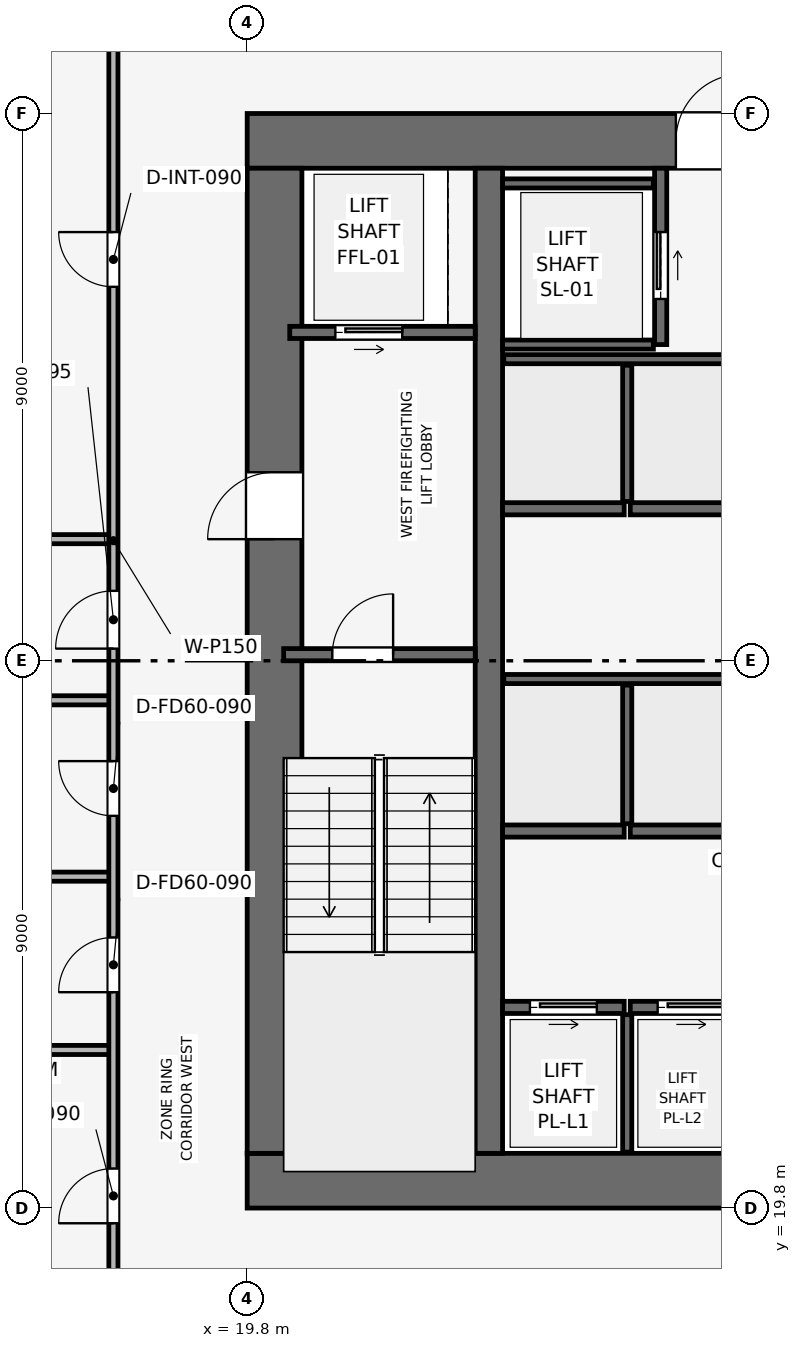
"""IFC4 building model, lengths in metres.
Left out: names, types, materials, properties, quantities, classifications, styles, units other than length and angle.
Written with IfcOpenShell. Run it as: python <this file> out.ifc"""

import sys

from ifc_helpers import new_model, si_unit, direction, frame, frame_2d, origin, place, context, subcontext, project, spatial, rectangle, extrude, element, fill, save


model = new_model("IFC4")
c1 = context("Model", 3, precision=1e-05, world=origin(), true_north=direction((0.0, 1.0)))
c2 = subcontext(c1, "Body", "Model", "MODEL_VIEW")
j1 = project(units=[si_unit("LENGTHUNIT", "METRE"), si_unit("PLANEANGLEUNIT", "RADIAN")], contexts=[c1])
p1 = place(None, origin())
s1 = spatial("IfcSite", under=j1, at=p1, CompositionType="ELEMENT")
p2 = place(p1, origin())
s2 = spatial("IfcBuilding", under=s1, at=p2, CompositionType="ELEMENT")
p3 = place(p2, frame((0.0, 0.0, 121.2)))
s3 = spatial("IfcBuildingStorey", under=s2, at=p3, CompositionType="ELEMENT", Elevation=121.2)
p4 = place(p3, frame((19.8, 20.25, 0.0), z_axis=(0.0, 0.0, 1.0), x_axis=(1.0, 0.0, 0.0)))
e1 = element("IfcWall", 1, at=p4, inside=s3, PredefinedType="SHEAR", context=c2, shape_type="SweptSolid", body=[
    extrude(rectangle(XDim=18.0, YDim=0.9, at=frame_2d((9.0, 0.0))), origin(), (0.0, 0.0, 1.0), 3.9),
])
p5 = place(p4, frame((8.4, 0.0, 0.0)))
e2 = element("IfcOpeningElement", 2, at=p5, cuts=e1, PredefinedType="OPENING", context=c2, shape_type="SweptSolid", body=[
    extrude(rectangle(XDim=1.2, YDim=2.2, at=frame_2d((0.6, 1.1))), frame((0.0, 0.46, 0.0), z_axis=(0.0, -1.0, 0.0), x_axis=(1.0, 0.0, 0.0)), (0.0, 0.0, 1.0), 0.92),
])
p6 = place(p3, frame((19.8, 37.35, 0.0), z_axis=(0.0, 0.0, 1.0), x_axis=(1.0, 0.0, 0.0)))
e3 = element("IfcWall", 3, at=p6, inside=s3, PredefinedType="SHEAR", context=c2, shape_type="SweptSolid", body=[
    extrude(rectangle(XDim=18.0, YDim=0.9, at=frame_2d((9.0, 0.0))), origin(), (0.0, 0.0, 1.0), 3.9),
])
p7 = place(p6, frame((7.05, 0.0, 0.0)))
e4 = element("IfcOpeningElement", 4, at=p7, cuts=e3, PredefinedType="OPENING", context=c2, shape_type="SweptSolid", body=[
    extrude(rectangle(XDim=1.1, YDim=2.15, at=frame_2d((0.55, 1.075))), frame((0.0, 0.46, 0.0), z_axis=(0.0, -1.0, 0.0), x_axis=(1.0, 0.0, 0.0)), (0.0, 0.0, 1.0), 0.92),
])
p8 = place(p3, frame((20.25, 20.7, 0.0), z_axis=(0.0, 0.0, 1.0), x_axis=(0.0, 1.0, 0.0)))
e5 = element("IfcWall", 5, at=p8, inside=s3, PredefinedType="SHEAR", context=c2, shape_type="SweptSolid", body=[
    extrude(rectangle(XDim=16.2, YDim=0.9, at=frame_2d((8.1, 0.0))), origin(), (0.0, 0.0, 1.0), 3.9),
])
p9 = place(p8, frame((10.1, 0.0, 0.0)))
e6 = element("IfcOpeningElement", 6, at=p9, cuts=e5, PredefinedType="OPENING", context=c2, shape_type="SweptSolid", body=[
    extrude(rectangle(XDim=1.1, YDim=2.15, at=frame_2d((0.55, 1.075))), frame((0.0, 0.46, 0.0), z_axis=(0.0, -1.0, 0.0), x_axis=(1.0, 0.0, 0.0)), (0.0, 0.0, 1.0), 0.92),
])
p10 = place(p3, frame((23.775, 20.7, 0.0), z_axis=(0.0, 0.0, 1.0), x_axis=(0.0, 1.0, 0.0)))
e7 = element("IfcWall", 7, at=p10, inside=s3, PredefinedType="SHEAR", context=c2, shape_type="SweptSolid", body=[
    extrude(rectangle(XDim=16.2, YDim=0.45, at=frame_2d((8.1, 0.0))), origin(), (0.0, 0.0, 1.0), 3.9),
])
p11 = place(p3, frame((20.4, 28.9, 0.0), z_axis=(0.0, 0.0, 1.0), x_axis=(1.0, 0.0, 0.0)))
e8 = element("IfcWall", 8, at=p11, inside=s3, PredefinedType="SHEAR", context=c2, shape_type="SweptSolid", body=[
    extrude(rectangle(XDim=3.15, YDim=0.2, at=frame_2d((1.575, 0.0))), origin(), (0.0, 0.0, 1.0), 3.65),
])
p12 = place(p11, frame((0.8, 0.0, 0.0)))
e9 = element("IfcOpeningElement", 9, at=p12, cuts=e8, PredefinedType="OPENING", context=c2, shape_type="SweptSolid", body=[
    extrude(rectangle(XDim=1.0, YDim=2.1, at=frame_2d((0.5, 1.05))), frame((0.0, 0.11, 0.0), z_axis=(0.0, -1.0, 0.0), x_axis=(1.0, 0.0, 0.0)), (0.0, 0.0, 1.0), 0.22),
])
p13 = place(p3, frame((20.5, 34.2, 0.0), z_axis=(0.0, 0.0, 1.0), x_axis=(1.0, 0.0, 0.0)))
e10 = element("IfcWall", 10, at=p13, inside=s3, PredefinedType="SHEAR", context=c2, shape_type="SweptSolid", body=[
    extrude(rectangle(XDim=3.05, YDim=0.2, at=frame_2d((1.525, 0.0))), origin(), (0.0, 0.0, 1.0), 3.65),
])
p14 = place(p13, frame((0.75, 0.0, 0.0)))
e11 = element("IfcOpeningElement", 11, at=p14, cuts=e10, PredefinedType="OPENING", context=c2, shape_type="SweptSolid", body=[
    extrude(rectangle(XDim=1.1, YDim=2.15, at=frame_2d((0.55, 1.075))), frame((0.0, 0.11, 0.0), z_axis=(0.0, -1.0, 0.0), x_axis=(1.0, 0.0, 0.0)), (0.0, 0.0, 1.0), 0.22),
])
p15 = place(p3, frame((26.6, 34.0, 0.0), z_axis=(0.0, 0.0, 1.0), x_axis=(0.0, 1.0, 0.0)))
e12 = element("IfcWall", 12, at=p15, inside=s3, PredefinedType="SHEAR", context=c2, shape_type="SweptSolid", body=[
    extrude(rectangle(XDim=2.9, YDim=0.2, at=frame_2d((1.45, 0.0))), origin(), (0.0, 0.0, 1.0), 3.65),
])
p16 = place(p15, frame((0.75, 0.0, 0.0)))
e13 = element("IfcOpeningElement", 13, at=p16, cuts=e12, PredefinedType="OPENING", context=c2, shape_type="SweptSolid", body=[
    extrude(rectangle(XDim=1.1, YDim=2.15, at=frame_2d((0.55, 1.075))), frame((0.0, 0.11, 0.0), z_axis=(0.0, -1.0, 0.0), x_axis=(1.0, 0.0, 0.0)), (0.0, 0.0, 1.0), 0.22),
])
for number, where, z_axis, x_axis in (
    (14, (24.0, 34.0, 0.0), (0.0, 0.0, 1.0), (1.0, 0.0, 0.0)),
    (15, (24.0, 36.65, 0.0), (0.0, 0.0, 1.0), (1.0, 0.0, 0.0)),
):
    element("IfcWall", number, at=place(p3, frame(where, z_axis=z_axis, x_axis=x_axis)), inside=s3, PredefinedType="SHEAR", context=c2, shape_type="SweptSolid", body=[
        extrude(rectangle(XDim=2.48, YDim=0.15, at=frame_2d((1.24, 0.0))), origin(), (0.0, 0.0, 1.0), 3.65),
    ])
p17 = place(p3, frame((24.0, 23.1, 0.0), z_axis=(0.0, 0.0, 1.0), x_axis=(1.0, 0.0, 0.0)))
e16 = element("IfcWall", 16, at=p17, inside=s3, PredefinedType="SHEAR", context=c2, shape_type="SweptSolid", body=[
    extrude(rectangle(XDim=2.0, YDim=0.2, at=frame_2d((1.0, 0.0))), origin(), (0.0, 0.0, 1.0), 3.65),
])
p18 = place(p17, frame((0.45, 0.0, 0.0)))
e17 = element("IfcOpeningElement", 17, at=p18, cuts=e16, PredefinedType="OPENING", context=c2, shape_type="SweptSolid", body=[
    extrude(rectangle(XDim=1.1, YDim=2.15, at=frame_2d((0.55, 1.075))), frame((0.0, 0.11, 0.0), z_axis=(0.0, -1.0, 0.0), x_axis=(1.0, 0.0, 0.0)), (0.0, 0.0, 1.0), 0.22),
])
p19 = place(p3, frame((26.1, 23.1, 0.0), z_axis=(0.0, 0.0, 1.0), x_axis=(1.0, 0.0, 0.0)))
e18 = element("IfcWall", 18, at=p19, inside=s3, PredefinedType="SHEAR", context=c2, shape_type="SweptSolid", body=[
    extrude(rectangle(XDim=2.0, YDim=0.2, at=frame_2d((1.0, 0.0))), origin(), (0.0, 0.0, 1.0), 3.65),
])
p20 = place(p19, frame((0.45, 0.0, 0.0)))
e19 = element("IfcOpeningElement", 19, at=p20, cuts=e18, PredefinedType="OPENING", context=c2, shape_type="SweptSolid", body=[
    extrude(rectangle(XDim=1.1, YDim=2.15, at=frame_2d((0.55, 1.075))), frame((0.0, 0.11, 0.0), z_axis=(0.0, -1.0, 0.0), x_axis=(1.0, 0.0, 0.0)), (0.0, 0.0, 1.0), 0.22),
])
for number, where, z_axis, x_axis in (
    (20, (24.0, 26.0, 0.0), (0.0, 0.0, 1.0), (1.0, 0.0, 0.0)),
    (21, (26.1, 26.0, 0.0), (0.0, 0.0, 1.0), (1.0, 0.0, 0.0)),
    (22, (24.0, 31.3, 0.0), (0.0, 0.0, 1.0), (1.0, 0.0, 0.0)),
    (23, (26.1, 31.3, 0.0), (0.0, 0.0, 1.0), (1.0, 0.0, 0.0)),
):
    element("IfcWall", number, at=place(p3, frame(where, z_axis=z_axis, x_axis=x_axis)), inside=s3, PredefinedType="SHEAR", context=c2, shape_type="SweptSolid", body=[
        extrude(rectangle(XDim=2.0, YDim=0.2, at=frame_2d((1.0, 0.0))), origin(), (0.0, 0.0, 1.0), 3.65),
    ])
p21 = place(p3, frame((26.05, 20.72, 0.0), z_axis=(0.0, 0.0, 1.0), x_axis=(0.0, 1.0, 0.0)))
e24 = element("IfcWall", 24, at=p21, inside=s3, PredefinedType="SHEAR", context=c2, shape_type="SweptSolid", body=[
    extrude(rectangle(XDim=2.26, YDim=0.15, at=frame_2d((1.13, 0.0))), origin(), (0.0, 0.0, 1.0), 3.65),
])
p22 = place(p3, frame((24.02, 28.5, 0.0), z_axis=(0.0, 0.0, 1.0), x_axis=(1.0, 0.0, 0.0)))
e25 = element("IfcWall", 25, at=p22, inside=s3, PredefinedType="SHEAR", context=c2, shape_type="SweptSolid", body=[
    extrude(rectangle(XDim=4.08, YDim=0.15, at=frame_2d((2.04, 0.0))), origin(), (0.0, 0.0, 1.0), 3.65),
])
p23 = place(p3, frame((26.05, 26.12, 0.0), z_axis=(0.0, 0.0, 1.0), x_axis=(0.0, 1.0, 0.0)))
e26 = element("IfcWall", 26, at=p23, inside=s3, PredefinedType="SHEAR", context=c2, shape_type="SweptSolid", body=[
    extrude(rectangle(XDim=2.28, YDim=0.15, at=frame_2d((1.14, 0.0))), origin(), (0.0, 0.0, 1.0), 3.65),
])
p24 = place(p3, frame((24.02, 33.76, 0.0), z_axis=(0.0, 0.0, 1.0), x_axis=(1.0, 0.0, 0.0)))
e27 = element("IfcWall", 27, at=p24, inside=s3, PredefinedType="SHEAR", context=c2, shape_type="SweptSolid", body=[
    extrude(rectangle(XDim=4.08, YDim=0.15, at=frame_2d((2.04, 0.0))), origin(), (0.0, 0.0, 1.0), 3.65),
])
p25 = place(p3, frame((26.05, 31.42, 0.0), z_axis=(0.0, 0.0, 1.0), x_axis=(0.0, 1.0, 0.0)))
e28 = element("IfcWall", 28, at=p25, inside=s3, PredefinedType="SHEAR", context=c2, shape_type="SweptSolid", body=[
    extrude(rectangle(XDim=2.24, YDim=0.15, at=frame_2d((1.12, 0.0))), origin(), (0.0, 0.0, 1.0), 3.65),
])
p26 = place(p3, frame((2.83, 22.4, 0.0), z_axis=(0.0, 0.0, 1.0), x_axis=(1.0, 0.0, 0.0)))
e29 = element("IfcWall", 29, at=p26, inside=s3, PredefinedType="PARTITIONING", context=c2, shape_type="SweptSolid", body=[
    extrude(rectangle(XDim=14.77, YDim=0.15, at=frame_2d((7.385, 0.0))), origin(), (0.0, 0.0, 1.0), 3.035),
])
p27 = place(p26, frame((5.335, 0.0, 0.0)))
e30 = element("IfcOpeningElement", 30, at=p27, cuts=e29, PredefinedType="OPENING", context=c2, shape_type="SweptSolid", body=[
    extrude(rectangle(XDim=0.9, YDim=2.1, at=frame_2d((0.45, 1.05))), frame((0.0, 0.085, 0.0), z_axis=(0.0, -1.0, 0.0), x_axis=(1.0, 0.0, 0.0)), (0.0, 0.0, 1.0), 0.17),
])
p28 = place(p3, frame((2.83, 30.8, 0.0), z_axis=(0.0, 0.0, 1.0), x_axis=(1.0, 0.0, 0.0)))
e31 = element("IfcWall", 31, at=p28, inside=s3, PredefinedType="PARTITIONING", context=c2, shape_type="SweptSolid", body=[
    extrude(rectangle(XDim=14.77, YDim=0.15, at=frame_2d((7.385, 0.0))), origin(), (0.0, 0.0, 1.0), 3.035),
])
for number, where, z_axis, x_axis in (
    (32, (14.4, 25.25, 0.0), (0.0, 0.0, 1.0), (1.0, 0.0, 0.0)),
    (33, (14.4, 28.15, 0.0), (0.0, 0.0, 1.0), (1.0, 0.0, 0.0)),
):
    element("IfcWall", number, at=place(p3, frame(where, z_axis=z_axis, x_axis=x_axis)), inside=s3, PredefinedType="PARTITIONING", context=c2, shape_type="SweptSolid", body=[
        extrude(rectangle(XDim=3.2, YDim=0.15, at=frame_2d((1.6, 0.0))), origin(), (0.0, 0.0, 1.0), 3.65),
    ])
p29 = place(p3, frame((17.6, 17.6, 0.0), z_axis=(0.0, 0.0, 1.0), x_axis=(0.0, 1.0, 0.0)))
e34 = element("IfcWall", 34, at=p29, inside=s3, PredefinedType="PARTITIONING", context=c2, shape_type="SweptSolid", body=[
    extrude(rectangle(XDim=22.4, YDim=0.15, at=frame_2d((11.2, 0.0))), origin(), (0.0, 0.0, 1.0), 3.185),
])
p30 = place(p29, frame((1.95, 0.0, 0.0)))
e35 = element("IfcOpeningElement", 35, at=p30, cuts=e34, PredefinedType="OPENING", context=c2, shape_type="SweptSolid", body=[
    extrude(rectangle(XDim=0.9, YDim=2.1, at=frame_2d((0.45, 1.05))), frame((0.0, 0.085, 0.0), z_axis=(0.0, -1.0, 0.0), x_axis=(1.0, 0.0, 0.0)), (0.0, 0.0, 1.0), 0.17),
])
p31 = place(p29, frame((5.75, 0.0, 0.0)))
e36 = element("IfcOpeningElement", 36, at=p31, cuts=e34, PredefinedType="OPENING", context=c2, shape_type="SweptSolid", body=[
    extrude(rectangle(XDim=0.9, YDim=2.1, at=frame_2d((0.45, 1.05))), frame((0.0, 0.085, 0.0), z_axis=(0.0, -1.0, 0.0), x_axis=(1.0, 0.0, 0.0)), (0.0, 0.0, 1.0), 0.17),
])
p32 = place(p29, frame((8.65, 0.0, 0.0)))
e37 = element("IfcOpeningElement", 37, at=p32, cuts=e34, PredefinedType="OPENING", context=c2, shape_type="SweptSolid", body=[
    extrude(rectangle(XDim=0.9, YDim=2.1, at=frame_2d((0.45, 1.05))), frame((0.0, 0.085, 0.0), z_axis=(0.0, -1.0, 0.0), x_axis=(1.0, 0.0, 0.0)), (0.0, 0.0, 1.0), 0.17),
])
p33 = place(p29, frame((11.4, 0.0, 0.0)))
e38 = element("IfcOpeningElement", 38, at=p33, cuts=e34, PredefinedType="OPENING", context=c2, shape_type="SweptSolid", body=[
    extrude(rectangle(XDim=0.95, YDim=2.1, at=frame_2d((0.475, 1.05))), frame((0.0, 0.085, 0.0), z_axis=(0.0, -1.0, 0.0), x_axis=(1.0, 0.0, 0.0)), (0.0, 0.0, 1.0), 0.17),
])
p34 = place(p29, frame((17.35, 0.0, 0.0)))
e39 = element("IfcOpeningElement", 39, at=p34, cuts=e34, PredefinedType="OPENING", context=c2, shape_type="SweptSolid", body=[
    extrude(rectangle(XDim=0.9, YDim=2.1, at=frame_2d((0.45, 1.05))), frame((0.0, 0.085, 0.0), z_axis=(0.0, -1.0, 0.0), x_axis=(1.0, 0.0, 0.0)), (0.0, 0.0, 1.0), 0.17),
])
p35 = place(p12, origin())
e40 = element("IfcDoor", 40, at=p35, inside=s3, OperationType="SINGLE_SWING_RIGHT", PredefinedType="DOOR", context=c2, shape_type="SweptSolid", body=[
    extrude(rectangle(XDim=1.0, YDim=2.1, at=frame_2d((0.5, 1.05))), frame((0.0, 0.025, 0.0), z_axis=(0.0, -1.0, 0.0), x_axis=(1.0, 0.0, 0.0)), (0.0, 0.0, 1.0), 0.05),
])
fill(e9, e40)
p36 = place(p14, origin())
e41 = element("IfcDoor", 41, at=p36, inside=s3, OperationType="SLIDING_TO_RIGHT", PredefinedType="DOOR", context=c2, shape_type="SweptSolid", body=[
    extrude(rectangle(XDim=1.1, YDim=2.15, at=frame_2d((0.55, 1.075))), frame((0.0, 0.025, 0.0), z_axis=(0.0, -1.0, 0.0), x_axis=(1.0, 0.0, 0.0)), (0.0, 0.0, 1.0), 0.05),
])
fill(e11, e41)
p37 = place(p16, origin())
e42 = element("IfcDoor", 42, at=p37, inside=s3, OperationType="SLIDING_TO_RIGHT", PredefinedType="DOOR", context=c2, shape_type="SweptSolid", body=[
    extrude(rectangle(XDim=1.1, YDim=2.15, at=frame_2d((0.55, 1.075))), frame((0.0, 0.025, 0.0), z_axis=(0.0, -1.0, 0.0), x_axis=(1.0, 0.0, 0.0)), (0.0, 0.0, 1.0), 0.05),
])
fill(e13, e42)
p38 = place(p18, origin())
e43 = element("IfcDoor", 43, at=p38, inside=s3, OperationType="SLIDING_TO_RIGHT", PredefinedType="DOOR", context=c2, shape_type="SweptSolid", body=[
    extrude(rectangle(XDim=1.1, YDim=2.15, at=frame_2d((0.55, 1.075))), frame((0.0, 0.025, 0.0), z_axis=(0.0, -1.0, 0.0), x_axis=(1.0, 0.0, 0.0)), (0.0, 0.0, 1.0), 0.05),
])
fill(e17, e43)
p39 = place(p20, origin())
e44 = element("IfcDoor", 44, at=p39, inside=s3, OperationType="SLIDING_TO_RIGHT", PredefinedType="DOOR", context=c2, shape_type="SweptSolid", body=[
    extrude(rectangle(XDim=1.1, YDim=2.15, at=frame_2d((0.55, 1.075))), frame((0.0, 0.025, 0.0), z_axis=(0.0, -1.0, 0.0), x_axis=(1.0, 0.0, 0.0)), (0.0, 0.0, 1.0), 0.05),
])
fill(e19, e44)
p40 = place(p30, origin())
e45 = element("IfcDoor", 45, at=p40, inside=s3, OperationType="SINGLE_SWING_LEFT", PredefinedType="DOOR", context=c2, shape_type="SweptSolid", body=[
    extrude(rectangle(XDim=0.9, YDim=2.1, at=frame_2d((0.45, 1.05))), frame((0.0, 0.025, 0.0), z_axis=(0.0, -1.0, 0.0), x_axis=(1.0, 0.0, 0.0)), (0.0, 0.0, 1.0), 0.05),
])
fill(e35, e45)
p41 = place(p31, origin())
e46 = element("IfcDoor", 46, at=p41, inside=s3, OperationType="SINGLE_SWING_LEFT", PredefinedType="DOOR", context=c2, shape_type="SweptSolid", body=[
    extrude(rectangle(XDim=0.9, YDim=2.1, at=frame_2d((0.45, 1.05))), frame((0.0, 0.025, 0.0), z_axis=(0.0, -1.0, 0.0), x_axis=(1.0, 0.0, 0.0)), (0.0, 0.0, 1.0), 0.05),
])
fill(e36, e46)
p42 = place(p32, origin())
e47 = element("IfcDoor", 47, at=p42, inside=s3, OperationType="SINGLE_SWING_RIGHT", PredefinedType="DOOR", context=c2, shape_type="SweptSolid", body=[
    extrude(rectangle(XDim=0.9, YDim=2.1, at=frame_2d((0.45, 1.05))), frame((0.0, 0.025, 0.0), z_axis=(0.0, -1.0, 0.0), x_axis=(1.0, 0.0, 0.0)), (0.0, 0.0, 1.0), 0.05),
])
fill(e37, e47)
p43 = place(p33, origin())
e48 = element("IfcDoor", 48, at=p43, inside=s3, OperationType="SINGLE_SWING_LEFT", PredefinedType="DOOR", context=c2, shape_type="SweptSolid", body=[
    extrude(rectangle(XDim=0.95, YDim=2.1, at=frame_2d((0.475, 1.05))), frame((0.0, 0.025, 0.0), z_axis=(0.0, -1.0, 0.0), x_axis=(1.0, 0.0, 0.0)), (0.0, 0.0, 1.0), 0.05),
])
fill(e38, e48)
p44 = place(p34, origin())
e49 = element("IfcDoor", 49, at=p44, inside=s3, OperationType="SINGLE_SWING_RIGHT", PredefinedType="DOOR", context=c2, shape_type="SweptSolid", body=[
    extrude(rectangle(XDim=0.9, YDim=2.1, at=frame_2d((0.45, 1.05))), frame((0.0, 0.025, 0.0), z_axis=(0.0, -1.0, 0.0), x_axis=(1.0, 0.0, 0.0)), (0.0, 0.0, 1.0), 0.05),
])
fill(e39, e49)
p45 = place(p9, origin())
e50 = element("IfcDoor", 50, at=p45, inside=s3, OperationType="SINGLE_SWING_LEFT", PredefinedType="DOOR", context=c2, shape_type="SweptSolid", body=[
    extrude(rectangle(XDim=1.1, YDim=2.15, at=frame_2d((0.55, 1.075))), frame((0.0, 0.025, 0.0), z_axis=(0.0, -1.0, 0.0), x_axis=(1.0, 0.0, 0.0)), (0.0, 0.0, 1.0), 0.05),
])
fill(e6, e50)
p46 = place(p7, origin())
e51 = element("IfcDoor", 51, at=p46, inside=s3, OperationType="SINGLE_SWING_RIGHT", PredefinedType="DOOR", context=c2, shape_type="SweptSolid", body=[
    extrude(rectangle(XDim=1.1, YDim=2.15, at=frame_2d((0.55, 1.075))), frame((0.0, 0.025, 0.0), z_axis=(0.0, -1.0, 0.0), x_axis=(1.0, 0.0, 0.0)), (0.0, 0.0, 1.0), 0.05),
])
fill(e4, e51)
save(model, sys.argv[1])
